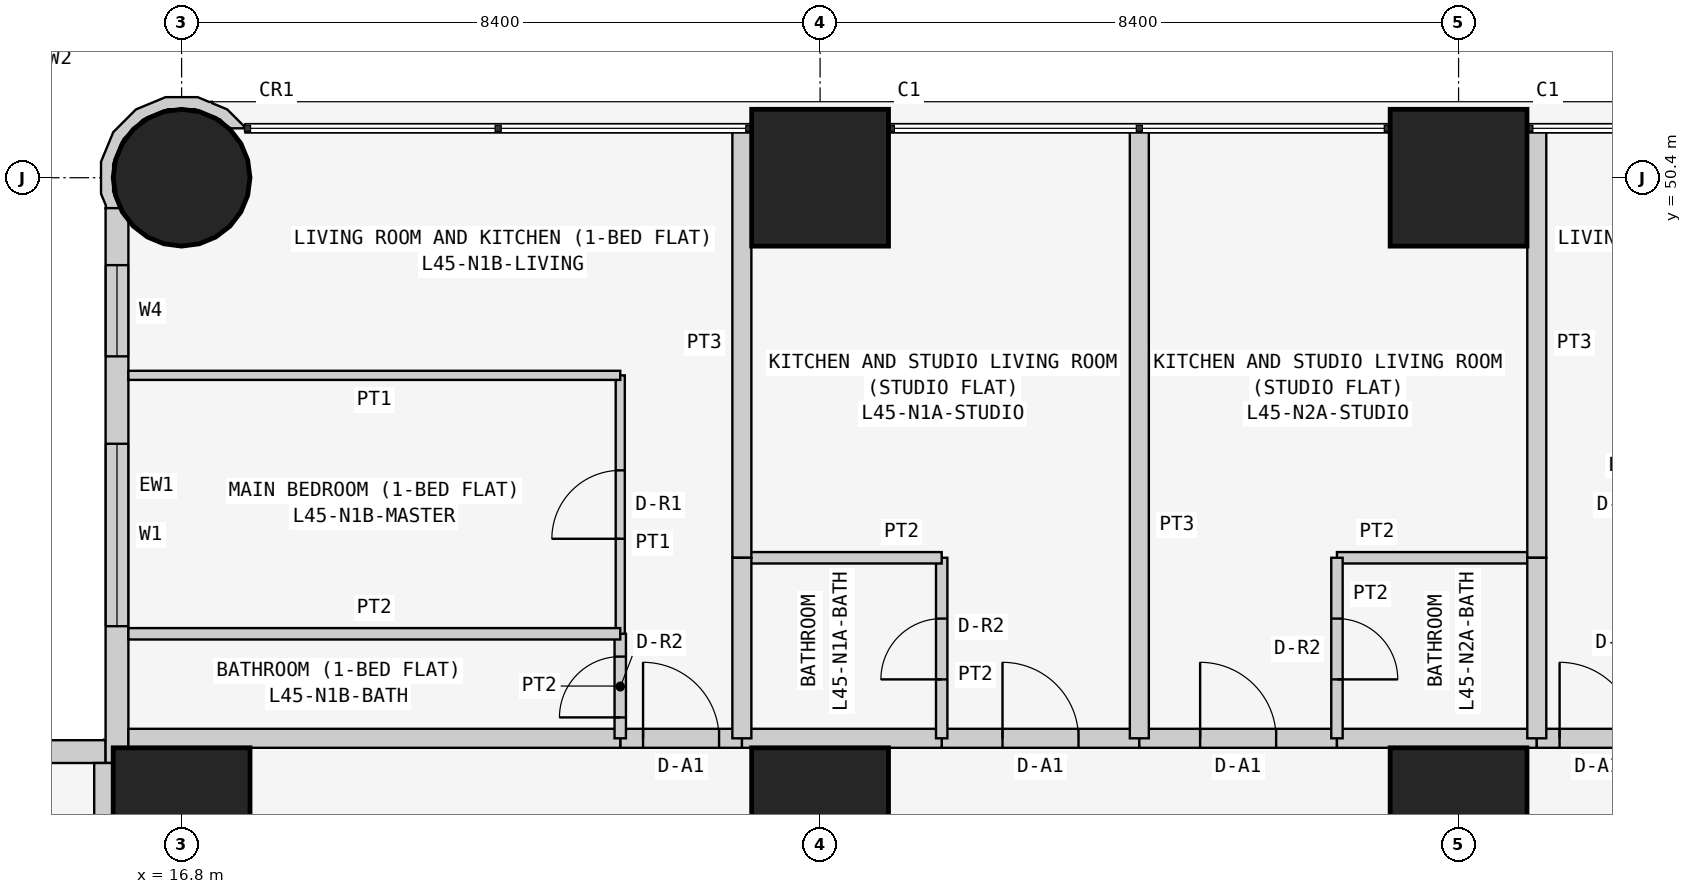
"""IFC4 building model, lengths in metres.
Left out: names, types, materials, properties, quantities, classifications, styles, units other than length and angle.
Written with IfcOpenShell. Run it as: python <this file> out.ifc"""

import sys

from ifc_helpers import new_model, si_unit, direction, frame, frame_2d, origin, origin_2d, place, context, subcontext, project, spatial, polyline, rectangle, circle, outline, extrude, element, fill, save


model = new_model("IFC4")
c1 = context("Model", 3, precision=1e-05, world=origin(), true_north=direction((0.0, 1.0)))
c2 = subcontext(c1, "Body", "Model", "MODEL_VIEW")
j1 = project(units=[si_unit("LENGTHUNIT", "METRE"), si_unit("PLANEANGLEUNIT", "RADIAN")], contexts=[c1])
p1 = place(None, origin())
s1 = spatial("IfcSite", under=j1, at=p1, CompositionType="ELEMENT")
p2 = place(p1, origin())
s2 = spatial("IfcBuilding", under=s1, at=p2, CompositionType="ELEMENT")
p3 = place(p2, frame((0.0, 0.0, 173.7)))
s3 = spatial("IfcBuildingStorey", under=s2, at=p3, CompositionType="ELEMENT", Elevation=173.7)
p4 = place(p3, frame((16.8, 42.0, 0.0), z_axis=(0.0, 0.0, 1.0), x_axis=(1.0, 0.0, 0.0)))
e1 = element("IfcColumn", 1, at=p4, inside=s3, PredefinedType="COLUMN", context=c2, shape_type="SweptSolid", body=[
    extrude(rectangle(XDim=1.8, YDim=1.8, at=origin_2d()), origin(), (0.0, 0.0, 1.0), 3.6),
])
p5 = place(p3, frame((16.8, 50.4, 0.0), z_axis=(0.0, 0.0, 1.0), x_axis=(1.0, 0.0, 0.0)))
e2 = element("IfcColumn", 2, at=p5, inside=s3, PredefinedType="COLUMN", context=c2, shape_type="SweptSolid", body=[
    extrude(circle(Radius=0.9, at=origin_2d()), origin(), (0.0, 0.0, 1.0), 3.6),
])
for number, where, z_axis, x_axis in (
    (3, (25.2, 42.0, 0.0), (0.0, 0.0, 1.0), (1.0, 0.0, 0.0)),
    (4, (25.2, 50.4, 0.0), (0.0, 0.0, 1.0), (1.0, 0.0, 0.0)),
    (5, (33.6, 42.0, 0.0), (0.0, 0.0, 1.0), (1.0, 0.0, 0.0)),
    (6, (33.6, 50.4, 0.0), (0.0, 0.0, 1.0), (1.0, 0.0, 0.0)),
):
    element("IfcColumn", number, at=place(p3, frame(where, z_axis=z_axis, x_axis=x_axis)), inside=s3, PredefinedType="COLUMN", context=c2, shape_type="SweptSolid", body=[
        extrude(rectangle(XDim=1.8, YDim=1.8, at=origin_2d()), origin(), (0.0, 0.0, 1.0), 3.6),
    ])
p6 = place(p3, frame((15.8, 42.85, 0.0), z_axis=(0.0, 0.0, 1.0), x_axis=(-1.0, 0.0, 0.0)))
e7 = element("IfcWall", 7, at=p6, inside=s3, PredefinedType="SOLIDWALL", context=c2, shape_type="SweptSolid", body=[
    extrude(rectangle(XDim=15.4, YDim=0.3, at=frame_2d((7.7, 0.0))), origin(), (0.0, 0.0, 1.0), 3.35),
])
p7 = place(p6, frame((1.2, 0.0, 0.9)))
e8 = element("IfcOpeningElement", 8, at=p7, cuts=e7, PredefinedType="OPENING", context=c2, shape_type="SweptSolid", body=[
    extrude(rectangle(XDim=1.8, YDim=1.5, at=frame_2d((0.9, 0.75))), frame((0.0, 0.16, 0.0), z_axis=(0.0, -1.0, 0.0), x_axis=(1.0, 0.0, 0.0)), (0.0, 0.0, 1.0), 0.32),
])
p8 = place(p6, frame((4.95, 0.0, 1.5)))
e9 = element("IfcOpeningElement", 9, at=p8, cuts=e7, PredefinedType="OPENING", context=c2, shape_type="SweptSolid", body=[
    extrude(rectangle(XDim=0.9, YDim=0.7, at=frame_2d((0.45, 0.35))), frame((0.0, 0.16, 0.0), z_axis=(0.0, -1.0, 0.0), x_axis=(1.0, 0.0, 0.0)), (0.0, 0.0, 1.0), 0.32),
])
p9 = place(p6, frame((8.5, 0.0, 0.9)))
e10 = element("IfcOpeningElement", 10, at=p9, cuts=e7, PredefinedType="OPENING", context=c2, shape_type="SweptSolid", body=[
    extrude(rectangle(XDim=1.8, YDim=1.5, at=frame_2d((0.9, 0.75))), frame((0.0, 0.16, 0.0), z_axis=(0.0, -1.0, 0.0), x_axis=(1.0, 0.0, 0.0)), (0.0, 0.0, 1.0), 0.32),
])
p10 = place(p6, frame((12.5, 0.0, 0.0)))
e11 = element("IfcOpeningElement", 11, at=p10, cuts=e7, PredefinedType="OPENING", context=c2, shape_type="SweptSolid", body=[
    extrude(rectangle(XDim=0.9, YDim=2.4, at=frame_2d((0.45, 1.2))), frame((0.0, 0.16, 0.0), z_axis=(0.0, -1.0, 0.0), x_axis=(1.0, 0.0, 0.0)), (0.0, 0.0, 1.0), 0.32),
])
p11 = place(p6, frame((13.5, 0.0, 0.9)))
e12 = element("IfcOpeningElement", 12, at=p11, cuts=e7, PredefinedType="OPENING", context=c2, shape_type="SweptSolid", body=[
    extrude(rectangle(XDim=1.2, YDim=1.5, at=frame_2d((0.6, 0.75))), frame((0.0, 0.16, 0.0), z_axis=(0.0, -1.0, 0.0), x_axis=(1.0, 0.0, 0.0)), (0.0, 0.0, 1.0), 0.32),
])
p12 = place(p3, frame((15.95, 50.0, 0.0), z_axis=(0.0, 0.0, 1.0), x_axis=(0.0, -1.0, 0.0)))
e13 = element("IfcWall", 13, at=p12, inside=s3, PredefinedType="SOLIDWALL", context=c2, shape_type="SweptSolid", body=[
    extrude(rectangle(XDim=7.3, YDim=0.3, at=frame_2d((3.65, 0.0))), origin(), (0.0, 0.0, 1.0), 3.35),
])
p13 = place(p12, frame((3.1, 0.0, 0.9)))
e14 = element("IfcOpeningElement", 14, at=p13, cuts=e13, PredefinedType="OPENING", context=c2, shape_type="SweptSolid", body=[
    extrude(rectangle(XDim=2.4, YDim=1.5, at=frame_2d((1.2, 0.75))), frame((0.0, 0.16, 0.0), z_axis=(0.0, -1.0, 0.0), x_axis=(1.0, 0.0, 0.0)), (0.0, 0.0, 1.0), 0.32),
])
p14 = place(p12, frame((0.75, 0.0, 0.9)))
e15 = element("IfcOpeningElement", 15, at=p14, cuts=e13, PredefinedType="OPENING", context=c2, shape_type="SweptSolid", body=[
    extrude(rectangle(XDim=1.2, YDim=1.5, at=frame_2d((0.6, 0.75))), frame((0.0, 0.16, 0.0), z_axis=(0.0, -1.0, 0.0), x_axis=(1.0, 0.0, 0.0)), (0.0, 0.0, 1.0), 0.32),
])
p15 = place(p3, frame((17.567, 51.011, 0.0), z_axis=(0.0, 0.0, 1.0), x_axis=(-0.377204953059, 0.926129809145, 0.0)))
e16 = element("IfcWall", 16, at=p15, inside=s3, PredefinedType="SOLIDWALL", context=c2, shape_type="SweptSolid", body=[
    extrude(outline(polyline([(-0.27, 2.017), (-0.37, 1.841), (-0.102, 1.842), (0.23, 1.707), (0.485, 1.455), (0.624, 1.125), (0.626, 0.766), (0.491, 0.434), (0.239, 0.18), (0.09, 0.117), (0.011, -0.078), (0.025, -0.083), (0.329, 0.045), (0.48, 0.197), (0.499, 0.193), (0.507, 0.225), (0.626, 0.345), (0.785, 0.736), (0.782, 1.157), (0.619, 1.546), (0.319, 1.842), (-0.072, 2.001), (-0.24, 2.0), (-0.27, 2.017)])), origin(), (0.0, 0.0, 1.0), 3.35),
])
p16 = place(p3, frame((26.8, 43.025, 0.0), z_axis=(0.0, 0.0, 1.0), x_axis=(1.0, 0.0, 0.0)))
e17 = element("IfcWall", 17, at=p16, inside=s3, PredefinedType="PARTITIONING", context=c2, shape_type="SweptSolid", body=[
    extrude(rectangle(XDim=2.6, YDim=0.25, at=frame_2d((1.3, 0.0))), origin(), (0.0, 0.0, 1.0), 3.35),
])
p17 = place(p16, frame((0.8, 0.0, 0.0)))
e18 = element("IfcOpeningElement", 18, at=p17, cuts=e17, PredefinedType="OPENING", context=c2, shape_type="SweptSolid", body=[
    extrude(rectangle(XDim=1.0, YDim=2.1, at=frame_2d((0.5, 1.05))), frame((0.0, 0.135, 0.0), z_axis=(0.0, -1.0, 0.0), x_axis=(1.0, 0.0, 0.0)), (0.0, 0.0, 1.0), 0.27),
])
p18 = place(p3, frame((24.171, 43.025, 0.0), z_axis=(0.0, 0.0, 1.0), x_axis=(1.0, 0.0, 0.0)))
e19 = element("IfcWall", 19, at=p18, inside=s3, PredefinedType="PARTITIONING", context=c2, shape_type="SweptSolid", body=[
    extrude(rectangle(XDim=2.629, YDim=0.25, at=frame_2d((1.314, 0.0))), origin(), (0.0, 0.0, 1.0), 3.35),
])
p19 = place(p3, frame((22.571, 43.025, 0.0), z_axis=(0.0, 0.0, 1.0), x_axis=(1.0, 0.0, 0.0)))
e20 = element("IfcWall", 20, at=p19, inside=s3, PredefinedType="PARTITIONING", context=c2, shape_type="SweptSolid", body=[
    extrude(rectangle(XDim=1.6, YDim=0.25, at=frame_2d((0.8, 0.0))), origin(), (0.0, 0.0, 1.0), 3.35),
])
p20 = place(p19, frame((0.3, 0.0, 0.0)))
e21 = element("IfcOpeningElement", 21, at=p20, cuts=e20, PredefinedType="OPENING", context=c2, shape_type="SweptSolid", body=[
    extrude(rectangle(XDim=1.0, YDim=2.1, at=frame_2d((0.5, 1.05))), frame((0.0, 0.135, 0.0), z_axis=(0.0, -1.0, 0.0), x_axis=(1.0, 0.0, 0.0)), (0.0, 0.0, 1.0), 0.27),
])
p21 = place(p3, frame((16.1, 43.025, 0.0), z_axis=(0.0, 0.0, 1.0), x_axis=(1.0, 0.0, 0.0)))
e22 = element("IfcWall", 22, at=p21, inside=s3, PredefinedType="PARTITIONING", context=c2, shape_type="SweptSolid", body=[
    extrude(rectangle(XDim=6.471, YDim=0.25, at=frame_2d((3.235, 0.0))), origin(), (0.0, 0.0, 1.0), 3.35),
])
p22 = place(p3, frame((29.4, 43.025, 0.0), z_axis=(0.0, 0.0, 1.0), x_axis=(1.0, 0.0, 0.0)))
e23 = element("IfcWall", 23, at=p22, inside=s3, PredefinedType="PARTITIONING", context=c2, shape_type="SweptSolid", body=[
    extrude(rectangle(XDim=2.6, YDim=0.25, at=frame_2d((1.3, 0.0))), origin(), (0.0, 0.0, 1.0), 3.35),
])
p23 = place(p22, frame((0.8, 0.0, 0.0)))
e24 = element("IfcOpeningElement", 24, at=p23, cuts=e23, PredefinedType="OPENING", context=c2, shape_type="SweptSolid", body=[
    extrude(rectangle(XDim=1.0, YDim=2.1, at=frame_2d((0.5, 1.05))), frame((0.0, 0.135, 0.0), z_axis=(0.0, -1.0, 0.0), x_axis=(1.0, 0.0, 0.0)), (0.0, 0.0, 1.0), 0.27),
])
p24 = place(p3, frame((32.0, 43.025, 0.0), z_axis=(0.0, 0.0, 1.0), x_axis=(1.0, 0.0, 0.0)))
e25 = element("IfcWall", 25, at=p24, inside=s3, PredefinedType="PARTITIONING", context=c2, shape_type="SweptSolid", body=[
    extrude(rectangle(XDim=2.629, YDim=0.25, at=frame_2d((1.314, 0.0))), origin(), (0.0, 0.0, 1.0), 3.35),
])
p25 = place(p3, frame((34.629, 43.025, 0.0), z_axis=(0.0, 0.0, 1.0), x_axis=(1.0, 0.0, 0.0)))
e26 = element("IfcWall", 26, at=p25, inside=s3, PredefinedType="PARTITIONING", context=c2, shape_type="SweptSolid", body=[
    extrude(rectangle(XDim=1.6, YDim=0.25, at=frame_2d((0.8, 0.0))), origin(), (0.0, 0.0, 1.0), 3.35),
])
p26 = place(p25, frame((0.3, 0.0, 0.0)))
e27 = element("IfcOpeningElement", 27, at=p26, cuts=e26, PredefinedType="OPENING", context=c2, shape_type="SweptSolid", body=[
    extrude(rectangle(XDim=1.0, YDim=2.1, at=frame_2d((0.5, 1.05))), frame((0.0, 0.135, 0.0), z_axis=(0.0, -1.0, 0.0), x_axis=(1.0, 0.0, 0.0)), (0.0, 0.0, 1.0), 0.27),
])
p27 = place(p3, frame((15.775, 36.229, 0.0), z_axis=(0.0, 0.0, 1.0), x_axis=(0.0, 1.0, 0.0)))
e28 = element("IfcWall", 28, at=p27, inside=s3, PredefinedType="PARTITIONING", context=c2, shape_type="SweptSolid", body=[
    extrude(rectangle(XDim=6.471, YDim=0.25, at=frame_2d((3.235, 0.0))), origin(), (0.0, 0.0, 1.0), 3.35),
])
p28 = place(p3, frame((26.8, 43.025, 0.0), z_axis=(0.0, 0.0, 1.0), x_axis=(0.0, 1.0, 0.0)))
e29 = element("IfcWall", 29, at=p28, inside=s3, PredefinedType="PARTITIONING", context=c2, shape_type="SweptSolid", body=[
    extrude(rectangle(XDim=2.375, YDim=0.15, at=frame_2d((1.188, 0.0))), origin(), (0.0, 0.0, 1.0), 3.35),
])
p29 = place(p28, frame((0.775, 0.0, 0.0)))
e30 = element("IfcOpeningElement", 30, at=p29, cuts=e29, PredefinedType="OPENING", context=c2, shape_type="SweptSolid", body=[
    extrude(rectangle(XDim=0.8, YDim=2.1, at=frame_2d((0.4, 1.05))), frame((0.0, 0.085, 0.0), z_axis=(0.0, -1.0, 0.0), x_axis=(1.0, 0.0, 0.0)), (0.0, 0.0, 1.0), 0.17),
])
p30 = place(p3, frame((26.8, 45.4, 0.0), z_axis=(0.0, 0.0, 1.0), x_axis=(-1.0, 0.0, 0.0)))
e31 = element("IfcWall", 31, at=p30, inside=s3, PredefinedType="PARTITIONING", context=c2, shape_type="SweptSolid", body=[
    extrude(rectangle(XDim=2.629, YDim=0.15, at=frame_2d((1.314, 0.0))), origin(), (0.0, 0.0, 1.0), 3.35),
])
p31 = place(p3, frame((24.171, 45.4, 0.0), z_axis=(0.0, 0.0, 1.0), x_axis=(0.0, 1.0, 0.0)))
e32 = element("IfcWall", 32, at=p31, inside=s3, PredefinedType="PARTITIONING", context=c2, shape_type="SweptSolid", body=[
    extrude(rectangle(XDim=5.65, YDim=0.25, at=frame_2d((2.825, 0.0))), origin(), (0.0, 0.0, 1.0), 3.35),
])
p32 = place(p3, frame((29.4, 51.05, 0.0), z_axis=(0.0, 0.0, 1.0), x_axis=(0.0, -1.0, 0.0)))
e33 = element("IfcWall", 33, at=p32, inside=s3, PredefinedType="PARTITIONING", context=c2, shape_type="SweptSolid", body=[
    extrude(rectangle(XDim=8.025, YDim=0.25, at=frame_2d((4.013, 0.0))), origin(), (0.0, 0.0, 1.0), 2.667),
])
p33 = place(p3, frame((24.171, 45.4, 0.0), z_axis=(0.0, 0.0, 1.0), x_axis=(0.0, -1.0, 0.0)))
e34 = element("IfcWall", 34, at=p33, inside=s3, PredefinedType="PARTITIONING", context=c2, shape_type="SweptSolid", body=[
    extrude(rectangle(XDim=2.375, YDim=0.25, at=frame_2d((1.188, 0.0))), origin(), (0.0, 0.0, 1.0), 3.35),
])
p34 = place(p3, frame((22.571, 43.025, 0.0), z_axis=(0.0, 0.0, 1.0), x_axis=(0.0, 1.0, 0.0)))
e35 = element("IfcWall", 35, at=p34, inside=s3, PredefinedType="PARTITIONING", context=c2, shape_type="SweptSolid", body=[
    extrude(rectangle(XDim=1.375, YDim=0.15, at=frame_2d((0.688, 0.0))), origin(), (0.0, 0.0, 1.0), 3.35),
])
p35 = place(p34, frame((0.275, 0.0, 0.0)))
e36 = element("IfcOpeningElement", 36, at=p35, cuts=e35, PredefinedType="OPENING", context=c2, shape_type="SweptSolid", body=[
    extrude(rectangle(XDim=0.8, YDim=2.1, at=frame_2d((0.4, 1.05))), frame((0.0, 0.085, 0.0), z_axis=(0.0, -1.0, 0.0), x_axis=(1.0, 0.0, 0.0)), (0.0, 0.0, 1.0), 0.17),
])
p36 = place(p3, frame((22.571, 44.4, 0.0), z_axis=(0.0, 0.0, 1.0), x_axis=(0.0, 1.0, 0.0)))
e37 = element("IfcWall", 37, at=p36, inside=s3, PredefinedType="PARTITIONING", context=c2, shape_type="SweptSolid", body=[
    extrude(rectangle(XDim=3.4, YDim=0.12, at=frame_2d((1.7, 0.0))), origin(), (0.0, 0.0, 1.0), 3.35),
])
p37 = place(p36, frame((1.25, 0.0, 0.0)))
e38 = element("IfcOpeningElement", 38, at=p37, cuts=e37, PredefinedType="OPENING", context=c2, shape_type="SweptSolid", body=[
    extrude(rectangle(XDim=0.9, YDim=2.1, at=frame_2d((0.45, 1.05))), frame((0.0, 0.07, 0.0), z_axis=(0.0, -1.0, 0.0), x_axis=(1.0, 0.0, 0.0)), (0.0, 0.0, 1.0), 0.14),
])
p38 = place(p3, frame((22.571, 47.8, 0.0), z_axis=(0.0, 0.0, 1.0), x_axis=(-1.0, 0.0, 0.0)))
e39 = element("IfcWall", 39, at=p38, inside=s3, PredefinedType="PARTITIONING", context=c2, shape_type="SweptSolid", body=[
    extrude(rectangle(XDim=6.471, YDim=0.12, at=frame_2d((3.235, 0.0))), origin(), (0.0, 0.0, 1.0), 3.35),
])
p39 = place(p3, frame((22.571, 44.4, 0.0), z_axis=(0.0, 0.0, 1.0), x_axis=(-1.0, 0.0, 0.0)))
e40 = element("IfcWall", 40, at=p39, inside=s3, PredefinedType="PARTITIONING", context=c2, shape_type="SweptSolid", body=[
    extrude(rectangle(XDim=6.471, YDim=0.15, at=frame_2d((3.235, 0.0))), origin(), (0.0, 0.0, 1.0), 3.35),
])
p40 = place(p3, frame((34.629, 45.4, 0.0), z_axis=(0.0, 0.0, 1.0), x_axis=(-1.0, 0.0, 0.0)))
e41 = element("IfcWall", 41, at=p40, inside=s3, PredefinedType="PARTITIONING", context=c2, shape_type="SweptSolid", body=[
    extrude(rectangle(XDim=2.629, YDim=0.15, at=frame_2d((1.314, 0.0))), origin(), (0.0, 0.0, 1.0), 3.35),
])
p41 = place(p3, frame((32.0, 45.4, 0.0), z_axis=(0.0, 0.0, 1.0), x_axis=(0.0, -1.0, 0.0)))
e42 = element("IfcWall", 42, at=p41, inside=s3, PredefinedType="PARTITIONING", context=c2, shape_type="SweptSolid", body=[
    extrude(rectangle(XDim=2.375, YDim=0.15, at=frame_2d((1.188, 0.0))), origin(), (0.0, 0.0, 1.0), 3.35),
])
p42 = place(p41, frame((0.8, 0.0, 0.0)))
e43 = element("IfcOpeningElement", 43, at=p42, cuts=e42, PredefinedType="OPENING", context=c2, shape_type="SweptSolid", body=[
    extrude(rectangle(XDim=0.8, YDim=2.1, at=frame_2d((0.4, 1.05))), frame((0.0, 0.085, 0.0), z_axis=(0.0, -1.0, 0.0), x_axis=(1.0, 0.0, 0.0)), (0.0, 0.0, 1.0), 0.17),
])
p43 = place(p3, frame((34.629, 51.05, 0.0), z_axis=(0.0, 0.0, 1.0), x_axis=(0.0, -1.0, 0.0)))
e44 = element("IfcWall", 44, at=p43, inside=s3, PredefinedType="PARTITIONING", context=c2, shape_type="SweptSolid", body=[
    extrude(rectangle(XDim=5.65, YDim=0.25, at=frame_2d((2.825, 0.0))), origin(), (0.0, 0.0, 1.0), 3.35),
])
p44 = place(p3, frame((34.629, 45.4, 0.0), z_axis=(0.0, 0.0, 1.0), x_axis=(0.0, -1.0, 0.0)))
e45 = element("IfcWall", 45, at=p44, inside=s3, PredefinedType="PARTITIONING", context=c2, shape_type="SweptSolid", body=[
    extrude(rectangle(XDim=2.375, YDim=0.25, at=frame_2d((1.188, 0.0))), origin(), (0.0, 0.0, 1.0), 3.35),
])
p45 = place(p13, origin())
e46 = element("IfcWindow", 46, at=p45, inside=s3, PartitioningType="SINGLE_PANEL", PredefinedType="WINDOW", context=c2, shape_type="SweptSolid", body=[
    extrude(rectangle(XDim=2.4, YDim=1.5, at=frame_2d((1.2, 0.75))), frame((0.0, 0.03, 0.0), z_axis=(0.0, -1.0, 0.0), x_axis=(1.0, 0.0, 0.0)), (0.0, 0.0, 1.0), 0.06),
])
fill(e14, e46)
p46 = place(p14, origin())
e47 = element("IfcWindow", 47, at=p46, inside=s3, PartitioningType="SINGLE_PANEL", PredefinedType="WINDOW", context=c2, shape_type="SweptSolid", body=[
    extrude(rectangle(XDim=1.2, YDim=1.5, at=frame_2d((0.6, 0.75))), frame((0.0, 0.03, 0.0), z_axis=(0.0, -1.0, 0.0), x_axis=(1.0, 0.0, 0.0)), (0.0, 0.0, 1.0), 0.06),
])
fill(e15, e47)
p47 = place(p17, origin())
e48 = element("IfcDoor", 48, at=p47, inside=s3, OperationType="SINGLE_SWING_LEFT", PredefinedType="DOOR", context=c2, shape_type="SweptSolid", body=[
    extrude(rectangle(XDim=1.0, YDim=2.1, at=frame_2d((0.5, 1.05))), frame((0.0, 0.025, 0.0), z_axis=(0.0, -1.0, 0.0), x_axis=(1.0, 0.0, 0.0)), (0.0, 0.0, 1.0), 0.05),
])
fill(e18, e48)
p48 = place(p29, origin())
e49 = element("IfcDoor", 49, at=p48, inside=s3, OperationType="SINGLE_SWING_LEFT", PredefinedType="DOOR", context=c2, shape_type="SweptSolid", body=[
    extrude(rectangle(XDim=0.8, YDim=2.1, at=frame_2d((0.4, 1.05))), frame((0.0, 0.025, 0.0), z_axis=(0.0, -1.0, 0.0), x_axis=(1.0, 0.0, 0.0)), (0.0, 0.0, 1.0), 0.05),
])
fill(e30, e49)
p49 = place(p20, origin())
e50 = element("IfcDoor", 50, at=p49, inside=s3, OperationType="SINGLE_SWING_LEFT", PredefinedType="DOOR", context=c2, shape_type="SweptSolid", body=[
    extrude(rectangle(XDim=1.0, YDim=2.1, at=frame_2d((0.5, 1.05))), frame((0.0, 0.025, 0.0), z_axis=(0.0, -1.0, 0.0), x_axis=(1.0, 0.0, 0.0)), (0.0, 0.0, 1.0), 0.05),
])
fill(e21, e50)
p50 = place(p35, origin())
e51 = element("IfcDoor", 51, at=p50, inside=s3, OperationType="SINGLE_SWING_LEFT", PredefinedType="DOOR", context=c2, shape_type="SweptSolid", body=[
    extrude(rectangle(XDim=0.8, YDim=2.1, at=frame_2d((0.4, 1.05))), frame((0.0, 0.025, 0.0), z_axis=(0.0, -1.0, 0.0), x_axis=(1.0, 0.0, 0.0)), (0.0, 0.0, 1.0), 0.05),
])
fill(e36, e51)
p51 = place(p37, origin())
e52 = element("IfcDoor", 52, at=p51, inside=s3, OperationType="SINGLE_SWING_LEFT", PredefinedType="DOOR", context=c2, shape_type="SweptSolid", body=[
    extrude(rectangle(XDim=0.9, YDim=2.1, at=frame_2d((0.45, 1.05))), frame((0.0, 0.025, 0.0), z_axis=(0.0, -1.0, 0.0), x_axis=(1.0, 0.0, 0.0)), (0.0, 0.0, 1.0), 0.05),
])
fill(e38, e52)
p52 = place(p23, origin())
e53 = element("IfcDoor", 53, at=p52, inside=s3, OperationType="SINGLE_SWING_LEFT", PredefinedType="DOOR", context=c2, shape_type="SweptSolid", body=[
    extrude(rectangle(XDim=1.0, YDim=2.1, at=frame_2d((0.5, 1.05))), frame((0.0, 0.025, 0.0), z_axis=(0.0, -1.0, 0.0), x_axis=(1.0, 0.0, 0.0)), (0.0, 0.0, 1.0), 0.05),
])
fill(e24, e53)
p53 = place(p42, origin())
e54 = element("IfcDoor", 54, at=p53, inside=s3, OperationType="SINGLE_SWING_RIGHT", PredefinedType="DOOR", context=c2, shape_type="SweptSolid", body=[
    extrude(rectangle(XDim=0.8, YDim=2.1, at=frame_2d((0.4, 1.05))), frame((0.0, 0.025, 0.0), z_axis=(0.0, -1.0, 0.0), x_axis=(1.0, 0.0, 0.0)), (0.0, 0.0, 1.0), 0.05),
])
fill(e43, e54)
p54 = place(p26, origin())
e55 = element("IfcDoor", 55, at=p54, inside=s3, OperationType="SINGLE_SWING_LEFT", PredefinedType="DOOR", context=c2, shape_type="SweptSolid", body=[
    extrude(rectangle(XDim=1.0, YDim=2.1, at=frame_2d((0.5, 1.05))), frame((0.0, 0.025, 0.0), z_axis=(0.0, -1.0, 0.0), x_axis=(1.0, 0.0, 0.0)), (0.0, 0.0, 1.0), 0.05),
])
fill(e27, e55)
save(model, sys.argv[1])
